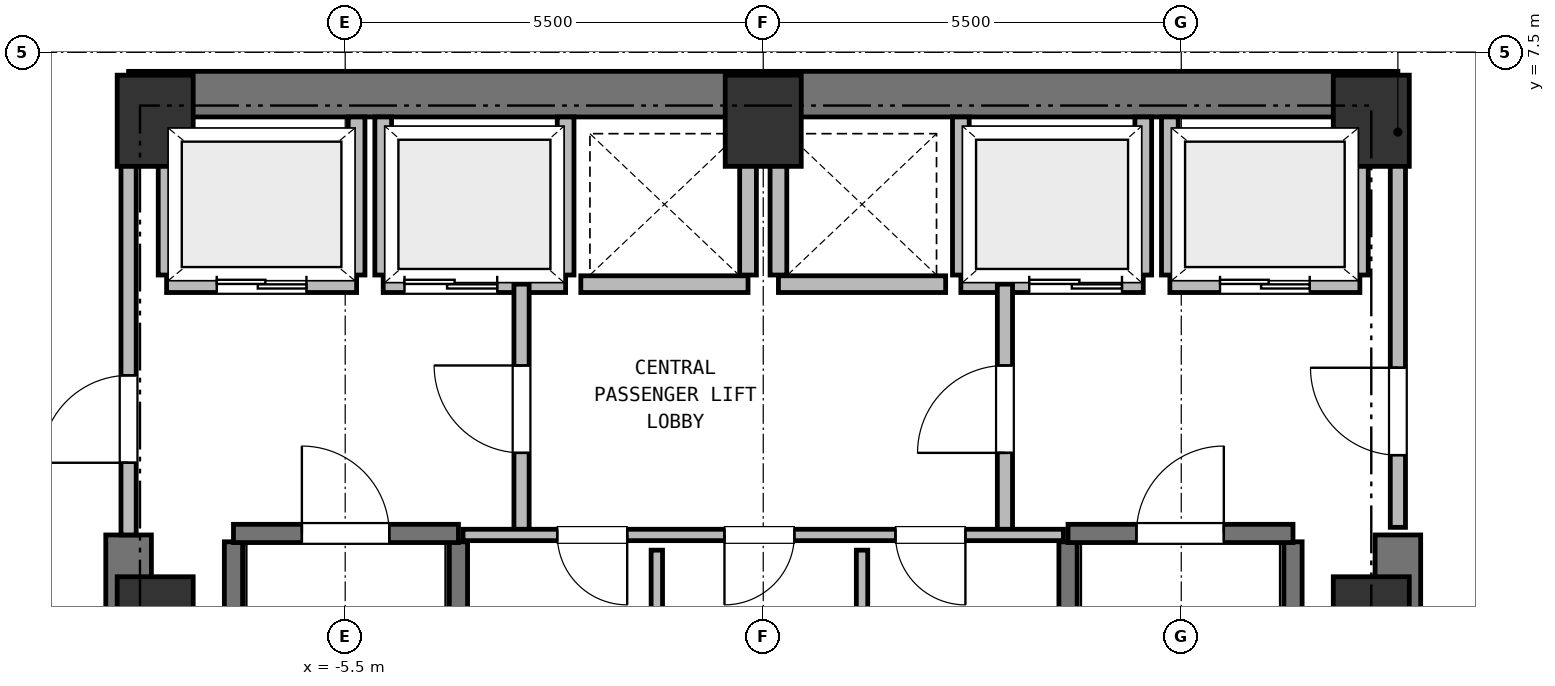
"""IFC4 building model, lengths in metres.
Left out: names, types, materials, properties, quantities, classifications, styles, units other than length and angle.
Written with IfcOpenShell. Run it as: python <this file> out.ifc"""

import sys

from ifc_helpers import new_model, si_unit, direction, frame, frame_2d, origin, origin_2d, place, context, subcontext, project, spatial, rectangle, extrude, element, fill, save


model = new_model("IFC4")
c1 = context("Model", 3, precision=1e-05, world=origin(), true_north=direction((0.0, 1.0)))
c2 = subcontext(c1, "Body", "Model", "MODEL_VIEW")
j1 = project(units=[si_unit("LENGTHUNIT", "METRE"), si_unit("PLANEANGLEUNIT", "RADIAN")], contexts=[c1])
p1 = place(None, origin())
s1 = spatial("IfcSite", under=j1, at=p1, CompositionType="ELEMENT")
p2 = place(p1, origin())
s2 = spatial("IfcBuilding", under=s1, at=p2, CompositionType="ELEMENT")
p3 = place(p2, frame((0.0, 0.0, 108.5)))
s3 = spatial("IfcBuildingStorey", under=s2, at=p3, CompositionType="ELEMENT", Elevation=108.5)
for number, where, z_axis, x_axis in (
    (1, (8.0, 0.0, 0.0), (0.0, 0.0, 1.0), (1.0, 0.0, 0.0)),
    (2, (8.0, 6.6, 0.0), (0.0, 0.0, 1.0), (1.0, 0.0, 0.0)),
    (3, (0.0, 6.6, 0.0), (0.0, 0.0, 1.0), (1.0, 0.0, 0.0)),
    (4, (-8.0, 6.6, 0.0), (0.0, 0.0, 1.0), (1.0, 0.0, 0.0)),
    (5, (-8.0, 0.0, 0.0), (0.0, 0.0, 1.0), (1.0, 0.0, 0.0)),
):
    element("IfcColumn", number, at=place(p3, frame(where, z_axis=z_axis, x_axis=x_axis)), inside=s3, PredefinedType="COLUMN", context=c2, shape_type="SweptSolid", body=[
        extrude(rectangle(XDim=1.0, YDim=1.2, at=origin_2d()), origin(), (0.0, 0.0, 1.0), 3.75),
    ])
p4 = place(p3, frame((-8.35, 6.95, 0.0), z_axis=(0.0, 0.0, 1.0), x_axis=(1.0, 0.0, 0.0)))
e6 = element("IfcWall", 6, at=p4, inside=s3, PredefinedType="SHEAR", context=c2, shape_type="SweptSolid", body=[
    extrude(rectangle(XDim=16.7, YDim=0.6, at=frame_2d((8.35, 0.0))), origin(), (0.0, 0.0, 1.0), 3.5),
])
for number, where, z_axis, x_axis in (
    (7, (-8.35, -6.95, 0.0), (0.0, 0.0, 1.0), (0.0, 1.0, 0.0)),
    (8, (8.35, -6.95, 0.0), (0.0, 0.0, 1.0), (0.0, 1.0, 0.0)),
):
    element("IfcWall", number, at=place(p3, frame(where, z_axis=z_axis, x_axis=x_axis)), inside=s3, PredefinedType="SHEAR", context=c2, shape_type="SweptSolid", body=[
        extrude(rectangle(XDim=8.1, YDim=0.6, at=frame_2d((4.05, 0.0))), origin(), (0.0, 0.0, 1.0), 3.5),
    ])
for number, where, z_axis, x_axis in (
    (9, (-6.97, -6.16, 0.0), (0.0, 0.0, 1.0), (0.0, 1.0, 0.0)),
    (10, (-4.01, -6.16, 0.0), (0.0, 0.0, 1.0), (0.0, 1.0, 0.0)),
):
    element("IfcWall", number, at=place(p3, frame(where, z_axis=z_axis, x_axis=x_axis)), inside=s3, PredefinedType="SHEAR", context=c2, shape_type="SweptSolid", body=[
        extrude(rectangle(XDim=7.22, YDim=0.24, at=frame_2d((3.61, 0.0))), origin(), (0.0, 0.0, 1.0), 3.5),
    ])
p5 = place(p3, frame((-6.97, 1.17, 0.0), z_axis=(0.0, 0.0, 1.0), x_axis=(1.0, 0.0, 0.0)))
e11 = element("IfcWall", 11, at=p5, inside=s3, PredefinedType="SHEAR", context=c2, shape_type="SweptSolid", body=[
    extrude(rectangle(XDim=2.96, YDim=0.24, at=frame_2d((1.48, 0.0))), origin(), (0.0, 0.0, 1.0), 3.5),
])
p6 = place(p5, frame((0.9, 0.0, 0.0)))
e12 = element("IfcOpeningElement", 12, at=p6, cuts=e11, PredefinedType="OPENING", context=c2, shape_type="SweptSolid", body=[
    extrude(rectangle(XDim=1.15, YDim=2.15, at=frame_2d((0.575, 1.075))), frame((0.0, 0.13, 0.0), z_axis=(0.0, -1.0, 0.0), x_axis=(1.0, 0.0, 0.0)), (0.0, 0.0, 1.0), 0.26),
])
for number, where, z_axis, x_axis in (
    (13, (4.01, -6.16, 0.0), (0.0, 0.0, 1.0), (0.0, 1.0, 0.0)),
    (14, (6.97, -6.16, 0.0), (0.0, 0.0, 1.0), (0.0, 1.0, 0.0)),
):
    element("IfcWall", number, at=place(p3, frame(where, z_axis=z_axis, x_axis=x_axis)), inside=s3, PredefinedType="SHEAR", context=c2, shape_type="SweptSolid", body=[
        extrude(rectangle(XDim=7.22, YDim=0.24, at=frame_2d((3.61, 0.0))), origin(), (0.0, 0.0, 1.0), 3.5),
    ])
p7 = place(p3, frame((4.01, 1.17, 0.0), z_axis=(0.0, 0.0, 1.0), x_axis=(1.0, 0.0, 0.0)))
e15 = element("IfcWall", 15, at=p7, inside=s3, PredefinedType="SHEAR", context=c2, shape_type="SweptSolid", body=[
    extrude(rectangle(XDim=2.96, YDim=0.24, at=frame_2d((1.48, 0.0))), origin(), (0.0, 0.0, 1.0), 3.5),
])
p8 = place(p7, frame((0.9, 0.0, 0.0)))
e16 = element("IfcOpeningElement", 16, at=p8, cuts=e15, PredefinedType="OPENING", context=c2, shape_type="SweptSolid", body=[
    extrude(rectangle(XDim=1.15, YDim=2.15, at=frame_2d((0.575, 1.075))), frame((0.0, 0.13, 0.0), z_axis=(0.0, -1.0, 0.0), x_axis=(1.0, 0.0, 0.0)), (0.0, 0.0, 1.0), 0.26),
])
p9 = place(p3, frame((-7.85, 4.45, 0.0), z_axis=(0.0, 0.0, 1.0), x_axis=(1.0, 0.0, 0.0)))
e17 = element("IfcWall", 17, at=p9, inside=s3, PredefinedType="PARTITIONING", context=c2, shape_type="SweptSolid", body=[
    extrude(rectangle(XDim=2.5, YDim=0.22, at=frame_2d((1.25, 0.0))), origin(), (0.0, 0.0, 1.0), 3.5),
])
p10 = place(p9, frame((0.66, 0.0, 0.0)))
e18 = element("IfcOpeningElement", 18, at=p10, cuts=e17, PredefinedType="OPENING", context=c2, shape_type="SweptSolid", body=[
    extrude(rectangle(XDim=1.18, YDim=2.15, at=frame_2d((0.59, 1.075))), frame((0.0, 0.12, 0.0), z_axis=(0.0, -1.0, 0.0), x_axis=(1.0, 0.0, 0.0)), (0.0, 0.0, 1.0), 0.24),
])
p11 = place(p3, frame((-7.85, 4.57, 0.0), z_axis=(0.0, 0.0, 1.0), x_axis=(0.0, 1.0, 0.0)))
e19 = element("IfcWall", 19, at=p11, inside=s3, PredefinedType="PARTITIONING", context=c2, shape_type="SweptSolid", body=[
    extrude(rectangle(XDim=2.08, YDim=0.22, at=frame_2d((1.04, 0.0))), origin(), (0.0, 0.0, 1.0), 3.12),
])
p12 = place(p3, frame((-5.35, 4.57, 0.0), z_axis=(0.0, 0.0, 1.0), x_axis=(0.0, 1.0, 0.0)))
e20 = element("IfcWall", 20, at=p12, inside=s3, PredefinedType="PARTITIONING", context=c2, shape_type="SweptSolid", body=[
    extrude(rectangle(XDim=2.08, YDim=0.22, at=frame_2d((1.04, 0.0))), origin(), (0.0, 0.0, 1.0), 3.5),
])
p13 = place(p3, frame((5.35, 4.45, 0.0), z_axis=(0.0, 0.0, 1.0), x_axis=(1.0, 0.0, 0.0)))
e21 = element("IfcWall", 21, at=p13, inside=s3, PredefinedType="PARTITIONING", context=c2, shape_type="SweptSolid", body=[
    extrude(rectangle(XDim=2.5, YDim=0.22, at=frame_2d((1.25, 0.0))), origin(), (0.0, 0.0, 1.0), 3.5),
])
p14 = place(p13, frame((0.66, 0.0, 0.0)))
e22 = element("IfcOpeningElement", 22, at=p14, cuts=e21, PredefinedType="OPENING", context=c2, shape_type="SweptSolid", body=[
    extrude(rectangle(XDim=1.18, YDim=2.15, at=frame_2d((0.59, 1.075))), frame((0.0, 0.12, 0.0), z_axis=(0.0, -1.0, 0.0), x_axis=(1.0, 0.0, 0.0)), (0.0, 0.0, 1.0), 0.24),
])
p15 = place(p3, frame((5.35, 4.57, 0.0), z_axis=(0.0, 0.0, 1.0), x_axis=(0.0, 1.0, 0.0)))
e23 = element("IfcWall", 23, at=p15, inside=s3, PredefinedType="PARTITIONING", context=c2, shape_type="SweptSolid", body=[
    extrude(rectangle(XDim=2.08, YDim=0.22, at=frame_2d((1.04, 0.0))), origin(), (0.0, 0.0, 1.0), 3.5),
])
p16 = place(p3, frame((7.85, 4.57, 0.0), z_axis=(0.0, 0.0, 1.0), x_axis=(0.0, 1.0, 0.0)))
e24 = element("IfcWall", 24, at=p16, inside=s3, PredefinedType="PARTITIONING", context=c2, shape_type="SweptSolid", body=[
    extrude(rectangle(XDim=2.08, YDim=0.22, at=frame_2d((1.04, 0.0))), origin(), (0.0, 0.0, 1.0), 3.12),
])
p17 = place(p3, frame((-5.0, 4.45, 0.0), z_axis=(0.0, 0.0, 1.0), x_axis=(1.0, 0.0, 0.0)))
e25 = element("IfcWall", 25, at=p17, inside=s3, PredefinedType="PARTITIONING", context=c2, shape_type="SweptSolid", body=[
    extrude(rectangle(XDim=2.4, YDim=0.22, at=frame_2d((1.2, 0.0))), origin(), (0.0, 0.0, 1.0), 3.5),
])
p18 = place(p17, frame((0.28, 0.0, 0.0)))
e26 = element("IfcOpeningElement", 26, at=p18, cuts=e25, PredefinedType="OPENING", context=c2, shape_type="SweptSolid", body=[
    extrude(rectangle(XDim=1.22, YDim=2.15, at=frame_2d((0.61, 1.075))), frame((0.0, 0.12, 0.0), z_axis=(0.0, -1.0, 0.0), x_axis=(1.0, 0.0, 0.0)), (0.0, 0.0, 1.0), 0.24),
])
for number, where, z_axis, x_axis in (
    (27, (-5.0, 4.57, 0.0), (0.0, 0.0, 1.0), (0.0, 1.0, 0.0)),
    (28, (-2.6, 4.57, 0.0), (0.0, 0.0, 1.0), (0.0, 1.0, 0.0)),
):
    element("IfcWall", number, at=place(p3, frame(where, z_axis=z_axis, x_axis=x_axis)), inside=s3, PredefinedType="PARTITIONING", context=c2, shape_type="SweptSolid", body=[
        extrude(rectangle(XDim=2.08, YDim=0.22, at=frame_2d((1.04, 0.0))), origin(), (0.0, 0.0, 1.0), 3.5),
    ])
p19 = place(p3, frame((2.6, 4.45, 0.0), z_axis=(0.0, 0.0, 1.0), x_axis=(1.0, 0.0, 0.0)))
e29 = element("IfcWall", 29, at=p19, inside=s3, PredefinedType="PARTITIONING", context=c2, shape_type="SweptSolid", body=[
    extrude(rectangle(XDim=2.4, YDim=0.22, at=frame_2d((1.2, 0.0))), origin(), (0.0, 0.0, 1.0), 3.5),
])
p20 = place(p19, frame((0.9, 0.0, 0.0)))
e30 = element("IfcOpeningElement", 30, at=p20, cuts=e29, PredefinedType="OPENING", context=c2, shape_type="SweptSolid", body=[
    extrude(rectangle(XDim=1.22, YDim=2.15, at=frame_2d((0.61, 1.075))), frame((0.0, 0.12, 0.0), z_axis=(0.0, -1.0, 0.0), x_axis=(1.0, 0.0, 0.0)), (0.0, 0.0, 1.0), 0.24),
])
for number, where, z_axis, x_axis in (
    (31, (2.6, 4.57, 0.0), (0.0, 0.0, 1.0), (0.0, 1.0, 0.0)),
    (32, (5.0, 4.57, 0.0), (0.0, 0.0, 1.0), (0.0, 1.0, 0.0)),
):
    element("IfcWall", number, at=place(p3, frame(where, z_axis=z_axis, x_axis=x_axis)), inside=s3, PredefinedType="PARTITIONING", context=c2, shape_type="SweptSolid", body=[
        extrude(rectangle(XDim=2.08, YDim=0.22, at=frame_2d((1.04, 0.0))), origin(), (0.0, 0.0, 1.0), 3.5),
    ])
p21 = place(p3, frame((-2.4, 4.45, 0.0), z_axis=(0.0, 0.0, 1.0), x_axis=(1.0, 0.0, 0.0)))
e33 = element("IfcWall", 33, at=p21, inside=s3, PredefinedType="PARTITIONING", context=c2, shape_type="SweptSolid", body=[
    extrude(rectangle(XDim=2.2, YDim=0.22, at=frame_2d((1.1, 0.0))), origin(), (0.0, 0.0, 1.0), 3.5),
])
p22 = place(p3, frame((-0.2, 4.57, 0.0), z_axis=(0.0, 0.0, 1.0), x_axis=(0.0, 1.0, 0.0)))
e34 = element("IfcWall", 34, at=p22, inside=s3, PredefinedType="PARTITIONING", context=c2, shape_type="SweptSolid", body=[
    extrude(rectangle(XDim=2.08, YDim=0.22, at=frame_2d((1.04, 0.0))), origin(), (0.0, 0.0, 1.0), 3.5),
])
p23 = place(p3, frame((0.2, 4.45, 0.0), z_axis=(0.0, 0.0, 1.0), x_axis=(1.0, 0.0, 0.0)))
e35 = element("IfcWall", 35, at=p23, inside=s3, PredefinedType="PARTITIONING", context=c2, shape_type="SweptSolid", body=[
    extrude(rectangle(XDim=2.2, YDim=0.22, at=frame_2d((1.1, 0.0))), origin(), (0.0, 0.0, 1.0), 3.5),
])
p24 = place(p3, frame((0.2, 4.57, 0.0), z_axis=(0.0, 0.0, 1.0), x_axis=(0.0, 1.0, 0.0)))
e36 = element("IfcWall", 36, at=p24, inside=s3, PredefinedType="PARTITIONING", context=c2, shape_type="SweptSolid", body=[
    extrude(rectangle(XDim=2.08, YDim=0.22, at=frame_2d((1.04, 0.0))), origin(), (0.0, 0.0, 1.0), 3.5),
])
p25 = place(p3, frame((-3.18, 1.15, 0.0), z_axis=(0.0, 0.0, 1.0), x_axis=(0.0, 1.0, 0.0)))
e37 = element("IfcWall", 37, at=p25, inside=s3, PredefinedType="PARTITIONING", context=c2, shape_type="SweptSolid", body=[
    extrude(rectangle(XDim=3.3, YDim=0.2, at=frame_2d((1.65, 0.0))), origin(), (0.0, 0.0, 1.0), 3.5),
])
p26 = place(p25, frame((1.08, 0.0, 0.0)))
e38 = element("IfcOpeningElement", 38, at=p26, cuts=e37, PredefinedType="OPENING", context=c2, shape_type="SweptSolid", body=[
    extrude(rectangle(XDim=1.15, YDim=2.15, at=frame_2d((0.575, 1.075))), frame((0.0, 0.11, 0.0), z_axis=(0.0, -1.0, 0.0), x_axis=(1.0, 0.0, 0.0)), (0.0, 0.0, 1.0), 0.22),
])
p27 = place(p3, frame((3.18, 1.15, 0.0), z_axis=(0.0, 0.0, 1.0), x_axis=(0.0, 1.0, 0.0)))
e39 = element("IfcWall", 39, at=p27, inside=s3, PredefinedType="PARTITIONING", context=c2, shape_type="SweptSolid", body=[
    extrude(rectangle(XDim=3.3, YDim=0.2, at=frame_2d((1.65, 0.0))), origin(), (0.0, 0.0, 1.0), 3.5),
])
p28 = place(p27, frame((1.08, 0.0, 0.0)))
e40 = element("IfcOpeningElement", 40, at=p28, cuts=e39, PredefinedType="OPENING", context=c2, shape_type="SweptSolid", body=[
    extrude(rectangle(XDim=1.15, YDim=2.15, at=frame_2d((0.575, 1.075))), frame((0.0, 0.11, 0.0), z_axis=(0.0, -1.0, 0.0), x_axis=(1.0, 0.0, 0.0)), (0.0, 0.0, 1.0), 0.22),
])
p29 = place(p3, frame((-8.35, 1.15, 0.0), z_axis=(0.0, 0.0, 1.0), x_axis=(0.0, 1.0, 0.0)))
e41 = element("IfcWall", 41, at=p29, inside=s3, PredefinedType="PARTITIONING", context=c2, shape_type="SweptSolid", body=[
    extrude(rectangle(XDim=5.4, YDim=0.2, at=frame_2d((2.7, 0.0))), origin(), (0.0, 0.0, 1.0), 3.5),
])
p30 = place(p29, frame((0.95, 0.0, 0.0)))
e42 = element("IfcOpeningElement", 42, at=p30, cuts=e41, PredefinedType="OPENING", context=c2, shape_type="SweptSolid", body=[
    extrude(rectangle(XDim=1.15, YDim=2.15, at=frame_2d((0.575, 1.075))), frame((0.0, 0.11, 0.0), z_axis=(0.0, -1.0, 0.0), x_axis=(1.0, 0.0, 0.0)), (0.0, 0.0, 1.0), 0.22),
])
p31 = place(p3, frame((8.35, 1.25, 0.0), z_axis=(0.0, 0.0, 1.0), x_axis=(0.0, 1.0, 0.0)))
e43 = element("IfcWall", 43, at=p31, inside=s3, PredefinedType="PARTITIONING", context=c2, shape_type="SweptSolid", body=[
    extrude(rectangle(XDim=5.3, YDim=0.2, at=frame_2d((2.65, 0.0))), origin(), (0.0, 0.0, 1.0), 3.5),
])
p32 = place(p31, frame((0.95, 0.0, 0.0)))
e44 = element("IfcOpeningElement", 44, at=p32, cuts=e43, PredefinedType="OPENING", context=c2, shape_type="SweptSolid", body=[
    extrude(rectangle(XDim=1.15, YDim=2.15, at=frame_2d((0.575, 1.075))), frame((0.0, 0.11, 0.0), z_axis=(0.0, -1.0, 0.0), x_axis=(1.0, 0.0, 0.0)), (0.0, 0.0, 1.0), 0.22),
])
p33 = place(p3, frame((3.95, 1.15, 0.0), z_axis=(0.0, 0.0, 1.0), x_axis=(-1.0, 0.0, 0.0)))
e45 = element("IfcWall", 45, at=p33, inside=s3, PredefinedType="PARTITIONING", context=c2, shape_type="SweptSolid", body=[
    extrude(rectangle(XDim=7.9, YDim=0.15, at=frame_2d((3.95, 0.0))), origin(), (0.0, 0.0, 1.0), 3.5),
])
p34 = place(p33, frame((5.74, 0.0, 0.0)))
e46 = element("IfcOpeningElement", 46, at=p34, cuts=e45, PredefinedType="OPENING", context=c2, shape_type="SweptSolid", body=[
    extrude(rectangle(XDim=0.92, YDim=2.05, at=frame_2d((0.46, 1.025))), frame((0.0, 0.085, 0.0), z_axis=(0.0, -1.0, 0.0), x_axis=(1.0, 0.0, 0.0)), (0.0, 0.0, 1.0), 0.17),
])
p35 = place(p33, frame((3.54, 0.0, 0.0)))
e47 = element("IfcOpeningElement", 47, at=p35, cuts=e45, PredefinedType="OPENING", context=c2, shape_type="SweptSolid", body=[
    extrude(rectangle(XDim=0.92, YDim=2.05, at=frame_2d((0.46, 1.025))), frame((0.0, 0.085, 0.0), z_axis=(0.0, -1.0, 0.0), x_axis=(1.0, 0.0, 0.0)), (0.0, 0.0, 1.0), 0.17),
])
p36 = place(p33, frame((1.29, 0.0, 0.0)))
e48 = element("IfcOpeningElement", 48, at=p36, cuts=e45, PredefinedType="OPENING", context=c2, shape_type="SweptSolid", body=[
    extrude(rectangle(XDim=0.92, YDim=2.05, at=frame_2d((0.46, 1.025))), frame((0.0, 0.085, 0.0), z_axis=(0.0, -1.0, 0.0), x_axis=(1.0, 0.0, 0.0)), (0.0, 0.0, 1.0), 0.17),
])
p37 = place(p3, frame((-1.4, -6.58, 0.0), z_axis=(0.0, 0.0, 1.0), x_axis=(0.0, 1.0, 0.0)))
e49 = element("IfcWall", 49, at=p37, inside=s3, PredefinedType="PARTITIONING", context=c2, shape_type="SweptSolid", body=[
    extrude(rectangle(XDim=7.53, YDim=0.15, at=frame_2d((3.765, 0.0))), origin(), (0.0, 0.0, 1.0), 3.5),
])
p38 = place(p3, frame((1.3, -4.08, 0.0), z_axis=(0.0, 0.0, 1.0), x_axis=(0.0, 1.0, 0.0)))
e50 = element("IfcWall", 50, at=p38, inside=s3, PredefinedType="PARTITIONING", context=c2, shape_type="SweptSolid", body=[
    extrude(rectangle(XDim=5.03, YDim=0.15, at=frame_2d((2.515, 0.0))), origin(), (0.0, 0.0, 1.0), 3.5),
])
for number, where, z_axis, x_axis in (
    (51, (8.678, 9.272, 0.0), (0.0, 0.0, 1.0), (0.707, -0.707, 0.0)),
    (52, (-10.722, 7.228, 0.0), (0.0, 0.0, 1.0), (0.707, 0.707, 0.0)),
):
    element("IfcWall", number, at=place(p3, frame(where, z_axis=z_axis, x_axis=x_axis)), inside=s3, PredefinedType="PARTITIONING", context=c2, shape_type="SweptSolid", body=[
        extrude(rectangle(XDim=2.89, YDim=0.15, at=frame_2d((1.445, 0.0))), origin(), (0.0, 0.0, 1.0), 3.5),
    ])
p39 = place(p6, origin())
e53 = element("IfcDoor", 53, at=p39, inside=s3, OperationType="SINGLE_SWING_LEFT", PredefinedType="DOOR", context=c2, shape_type="SweptSolid", body=[
    extrude(rectangle(XDim=1.15, YDim=2.15, at=frame_2d((0.575, 1.075))), frame((0.0, 0.025, 0.0), z_axis=(0.0, -1.0, 0.0), x_axis=(1.0, 0.0, 0.0)), (0.0, 0.0, 1.0), 0.05),
])
fill(e12, e53)
p40 = place(p8, origin())
e54 = element("IfcDoor", 54, at=p40, inside=s3, OperationType="SINGLE_SWING_RIGHT", PredefinedType="DOOR", context=c2, shape_type="SweptSolid", body=[
    extrude(rectangle(XDim=1.15, YDim=2.15, at=frame_2d((0.575, 1.075))), frame((0.0, 0.025, 0.0), z_axis=(0.0, -1.0, 0.0), x_axis=(1.0, 0.0, 0.0)), (0.0, 0.0, 1.0), 0.05),
])
fill(e16, e54)
p41 = place(p10, origin())
e55 = element("IfcDoor", 55, at=p41, inside=s3, OperationType="DOUBLE_DOOR_SLIDING", PredefinedType="DOOR", context=c2, shape_type="SweptSolid", body=[
    extrude(rectangle(XDim=1.18, YDim=2.15, at=frame_2d((0.59, 1.075))), frame((0.0, 0.025, 0.0), z_axis=(0.0, -1.0, 0.0), x_axis=(1.0, 0.0, 0.0)), (0.0, 0.0, 1.0), 0.05),
])
fill(e18, e55)
p42 = place(p14, origin())
e56 = element("IfcDoor", 56, at=p42, inside=s3, OperationType="DOUBLE_DOOR_SLIDING", PredefinedType="DOOR", context=c2, shape_type="SweptSolid", body=[
    extrude(rectangle(XDim=1.18, YDim=2.15, at=frame_2d((0.59, 1.075))), frame((0.0, 0.025, 0.0), z_axis=(0.0, -1.0, 0.0), x_axis=(1.0, 0.0, 0.0)), (0.0, 0.0, 1.0), 0.05),
])
fill(e22, e56)
p43 = place(p18, origin())
e57 = element("IfcDoor", 57, at=p43, inside=s3, OperationType="DOUBLE_DOOR_SLIDING", PredefinedType="DOOR", context=c2, shape_type="SweptSolid", body=[
    extrude(rectangle(XDim=1.22, YDim=2.15, at=frame_2d((0.61, 1.075))), frame((0.0, 0.025, 0.0), z_axis=(0.0, -1.0, 0.0), x_axis=(1.0, 0.0, 0.0)), (0.0, 0.0, 1.0), 0.05),
])
fill(e26, e57)
p44 = place(p20, origin())
e58 = element("IfcDoor", 58, at=p44, inside=s3, OperationType="DOUBLE_DOOR_SLIDING", PredefinedType="DOOR", context=c2, shape_type="SweptSolid", body=[
    extrude(rectangle(XDim=1.22, YDim=2.15, at=frame_2d((0.61, 1.075))), frame((0.0, 0.025, 0.0), z_axis=(0.0, -1.0, 0.0), x_axis=(1.0, 0.0, 0.0)), (0.0, 0.0, 1.0), 0.05),
])
fill(e30, e58)
p45 = place(p26, origin())
e59 = element("IfcDoor", 59, at=p45, inside=s3, OperationType="SINGLE_SWING_RIGHT", PredefinedType="DOOR", context=c2, shape_type="SweptSolid", body=[
    extrude(rectangle(XDim=1.15, YDim=2.15, at=frame_2d((0.575, 1.075))), frame((0.0, 0.025, 0.0), z_axis=(0.0, -1.0, 0.0), x_axis=(1.0, 0.0, 0.0)), (0.0, 0.0, 1.0), 0.05),
])
fill(e38, e59)
p46 = place(p28, origin())
e60 = element("IfcDoor", 60, at=p46, inside=s3, OperationType="SINGLE_SWING_LEFT", PredefinedType="DOOR", context=c2, shape_type="SweptSolid", body=[
    extrude(rectangle(XDim=1.15, YDim=2.15, at=frame_2d((0.575, 1.075))), frame((0.0, 0.025, 0.0), z_axis=(0.0, -1.0, 0.0), x_axis=(1.0, 0.0, 0.0)), (0.0, 0.0, 1.0), 0.05),
])
fill(e40, e60)
p47 = place(p30, origin())
e61 = element("IfcDoor", 61, at=p47, inside=s3, OperationType="SINGLE_SWING_LEFT", PredefinedType="DOOR", context=c2, shape_type="SweptSolid", body=[
    extrude(rectangle(XDim=1.15, YDim=2.15, at=frame_2d((0.575, 1.075))), frame((0.0, 0.025, 0.0), z_axis=(0.0, -1.0, 0.0), x_axis=(1.0, 0.0, 0.0)), (0.0, 0.0, 1.0), 0.05),
])
fill(e42, e61)
p48 = place(p32, origin())
e62 = element("IfcDoor", 62, at=p48, inside=s3, OperationType="SINGLE_SWING_RIGHT", PredefinedType="DOOR", context=c2, shape_type="SweptSolid", body=[
    extrude(rectangle(XDim=1.15, YDim=2.15, at=frame_2d((0.575, 1.075))), frame((0.0, 0.025, 0.0), z_axis=(0.0, -1.0, 0.0), x_axis=(1.0, 0.0, 0.0)), (0.0, 0.0, 1.0), 0.05),
])
fill(e44, e62)
p49 = place(p34, origin())
e63 = element("IfcDoor", 63, at=p49, inside=s3, OperationType="SINGLE_SWING_LEFT", PredefinedType="DOOR", context=c2, shape_type="SweptSolid", body=[
    extrude(rectangle(XDim=0.92, YDim=2.05, at=frame_2d((0.46, 1.025))), frame((0.0, 0.025, 0.0), z_axis=(0.0, -1.0, 0.0), x_axis=(1.0, 0.0, 0.0)), (0.0, 0.0, 1.0), 0.05),
])
fill(e46, e63)
p50 = place(p35, origin())
e64 = element("IfcDoor", 64, at=p50, inside=s3, OperationType="SINGLE_SWING_RIGHT", PredefinedType="DOOR", context=c2, shape_type="SweptSolid", body=[
    extrude(rectangle(XDim=0.92, YDim=2.05, at=frame_2d((0.46, 1.025))), frame((0.0, 0.025, 0.0), z_axis=(0.0, -1.0, 0.0), x_axis=(1.0, 0.0, 0.0)), (0.0, 0.0, 1.0), 0.05),
])
fill(e47, e64)
p51 = place(p36, origin())
e65 = element("IfcDoor", 65, at=p51, inside=s3, OperationType="SINGLE_SWING_LEFT", PredefinedType="DOOR", context=c2, shape_type="SweptSolid", body=[
    extrude(rectangle(XDim=0.92, YDim=2.05, at=frame_2d((0.46, 1.025))), frame((0.0, 0.025, 0.0), z_axis=(0.0, -1.0, 0.0), x_axis=(1.0, 0.0, 0.0)), (0.0, 0.0, 1.0), 0.05),
])
fill(e48, e65)
save(model, sys.argv[1])
